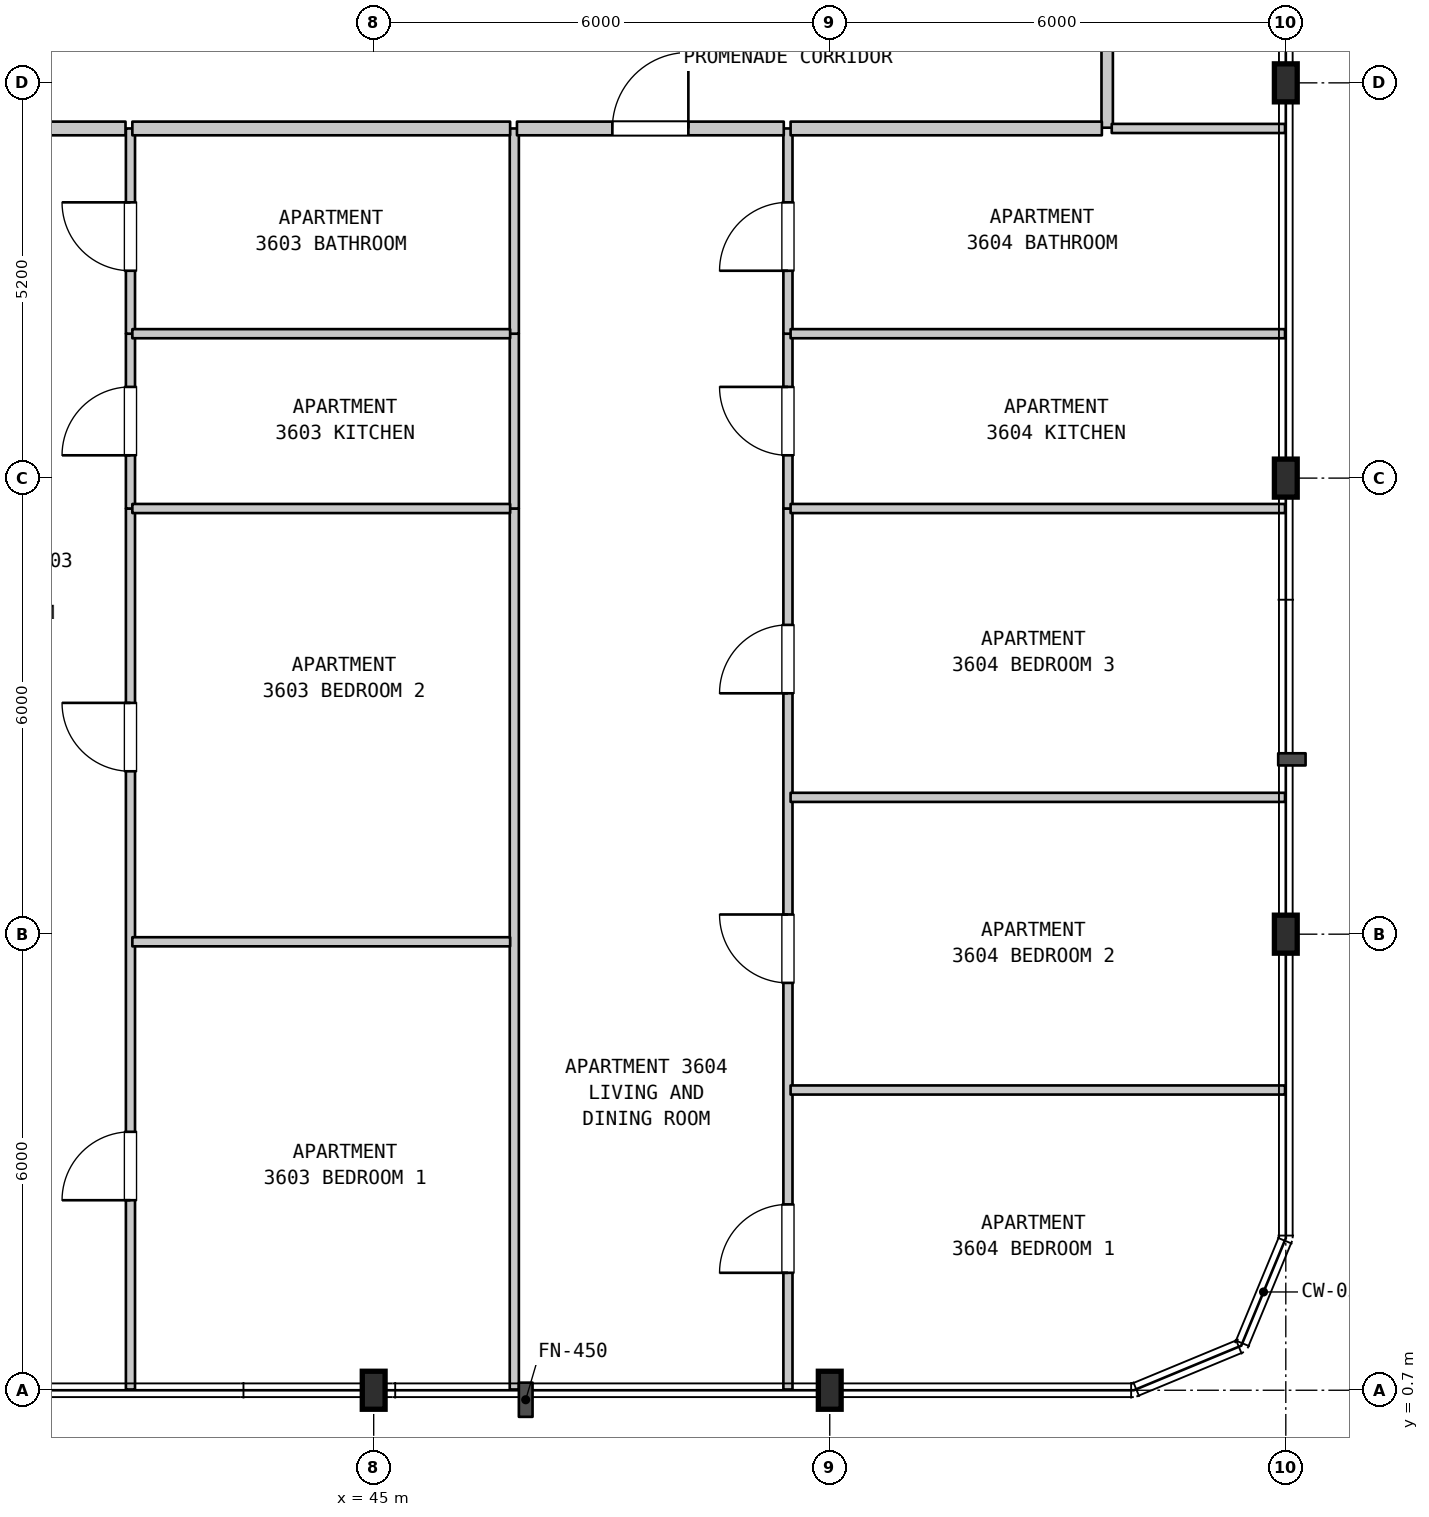
"""IFC4 building model, lengths in metres.
Left out: names, types, materials, properties, quantities, classifications, styles, units other than length and angle.
Written with IfcOpenShell. Run it as: python <this file> out.ifc"""

import sys

from ifc_helpers import new_model, si_unit, direction, frame, frame_2d, origin, origin_2d, place, context, subcontext, project, spatial, rectangle, i_section, extrude, element, fill, save


model = new_model("IFC4")
c1 = context("Model", 3, precision=1e-05, world=origin(), true_north=direction((0.0, 1.0)))
c2 = subcontext(c1, "Body", "Model", "MODEL_VIEW")
j1 = project(units=[si_unit("LENGTHUNIT", "METRE"), si_unit("PLANEANGLEUNIT", "RADIAN")], contexts=[c1])
p1 = place(None, origin())
s1 = spatial("IfcSite", under=j1, at=p1, CompositionType="ELEMENT")
p2 = place(p1, origin())
s2 = spatial("IfcBuilding", under=s1, at=p2, CompositionType="ELEMENT")
p3 = place(p2, frame((0.0, 0.0, 148.3)))
s3 = spatial("IfcBuildingStorey", under=s2, at=p3, CompositionType="ELEMENT", Elevation=148.3)
for number, where, z_axis, x_axis in (
    (1, (45.0, 0.7, 0.0), (0.0, 0.0, 1.0), (1.0, 0.0, 0.0)),
    (2, (51.0, 0.7, 0.0), (0.0, 0.0, 1.0), (1.0, 0.0, 0.0)),
    (3, (57.0, 6.7, 0.0), (0.0, 0.0, 1.0), (1.0, 0.0, 0.0)),
    (4, (57.0, 12.7, 0.0), (0.0, 0.0, 1.0), (1.0, 0.0, 0.0)),
    (5, (57.0, 17.9, 0.0), (0.0, 0.0, 1.0), (1.0, 0.0, 0.0)),
):
    element("IfcColumn", number, at=place(p3, frame(where, z_axis=z_axis, x_axis=x_axis)), inside=s3, PredefinedType="COLUMN", context=c2, shape_type="SweptSolid", body=[
        extrude(i_section(OverallWidth=0.3, OverallDepth=0.5, WebThickness=0.014, FlangeThickness=0.028, FilletRadius=0.027, at=origin_2d()), origin(), (0.0, 0.0, 1.0), 3.7),
    ])
p4 = place(p3, frame((41.8, 0.71, 0.0), z_axis=(0.0, 0.0, 1.0), x_axis=(0.0, 1.0, 0.0)))
e6 = element("IfcWall", 6, at=p4, inside=s3, PredefinedType="PARTITIONING", context=c2, shape_type="SweptSolid", body=[
    extrude(rectangle(XDim=11.59, YDim=0.12, at=frame_2d((5.795, 0.0))), origin(), (0.0, 0.0, 1.0), 3.385),
])
p5 = place(p4, frame((2.49, 0.0, 0.0)))
e7 = element("IfcOpeningElement", 7, at=p5, cuts=e6, PredefinedType="OPENING", context=c2, shape_type="SweptSolid", body=[
    extrude(rectangle(XDim=0.9, YDim=2.15, at=frame_2d((0.45, 1.075))), frame((0.0, 0.07, 0.0), z_axis=(0.0, -1.0, 0.0), x_axis=(1.0, 0.0, 0.0)), (0.0, 0.0, 1.0), 0.14),
])
p6 = place(p4, frame((8.133, 0.0, 0.0)))
e8 = element("IfcOpeningElement", 8, at=p6, cuts=e6, PredefinedType="OPENING", context=c2, shape_type="SweptSolid", body=[
    extrude(rectangle(XDim=0.9, YDim=2.15, at=frame_2d((0.45, 1.075))), frame((0.0, 0.07, 0.0), z_axis=(0.0, -1.0, 0.0), x_axis=(1.0, 0.0, 0.0)), (0.0, 0.0, 1.0), 0.14),
])
p7 = place(p3, frame((41.8, 12.3, 0.0), z_axis=(0.0, 0.0, 1.0), x_axis=(0.0, 1.0, 0.0)))
e9 = element("IfcWall", 9, at=p7, inside=s3, PredefinedType="PARTITIONING", context=c2, shape_type="SweptSolid", body=[
    extrude(rectangle(XDim=2.3, YDim=0.12, at=frame_2d((1.15, 0.0))), origin(), (0.0, 0.0, 1.0), 3.385),
])
p8 = place(p7, frame((0.7, 0.0, 0.0)))
e10 = element("IfcOpeningElement", 10, at=p8, cuts=e9, PredefinedType="OPENING", context=c2, shape_type="SweptSolid", body=[
    extrude(rectangle(XDim=0.9, YDim=2.15, at=frame_2d((0.45, 1.075))), frame((0.0, 0.07, 0.0), z_axis=(0.0, -1.0, 0.0), x_axis=(1.0, 0.0, 0.0)), (0.0, 0.0, 1.0), 0.14),
])
p9 = place(p3, frame((41.8, 14.6, 0.0), z_axis=(0.0, 0.0, 1.0), x_axis=(0.0, 1.0, 0.0)))
e11 = element("IfcWall", 11, at=p9, inside=s3, PredefinedType="PARTITIONING", context=c2, shape_type="SweptSolid", body=[
    extrude(rectangle(XDim=2.7, YDim=0.12, at=frame_2d((1.35, 0.0))), origin(), (0.0, 0.0, 1.0), 3.385),
])
p10 = place(p9, frame((0.828, 0.0, 0.0)))
e12 = element("IfcOpeningElement", 12, at=p10, cuts=e11, PredefinedType="OPENING", context=c2, shape_type="SweptSolid", body=[
    extrude(rectangle(XDim=0.9, YDim=2.1, at=frame_2d((0.45, 1.05))), frame((0.0, 0.07, 0.0), z_axis=(0.0, -1.0, 0.0), x_axis=(1.0, 0.0, 0.0)), (0.0, 0.0, 1.0), 0.14),
])
p11 = place(p3, frame((46.85, 0.71, 0.0), z_axis=(0.0, 0.0, 1.0), x_axis=(0.0, 1.0, 0.0)))
e13 = element("IfcWall", 13, at=p11, inside=s3, PredefinedType="PARTITIONING", context=c2, shape_type="SweptSolid", body=[
    extrude(rectangle(XDim=11.59, YDim=0.12, at=frame_2d((5.795, 0.0))), origin(), (0.0, 0.0, 1.0), 3.385),
])
p12 = place(p3, frame((46.85, 12.3, 0.0), z_axis=(0.0, 0.0, 1.0), x_axis=(0.0, 1.0, 0.0)))
e14 = element("IfcWall", 14, at=p12, inside=s3, PredefinedType="PARTITIONING", context=c2, shape_type="SweptSolid", body=[
    extrude(rectangle(XDim=2.3, YDim=0.12, at=frame_2d((1.15, 0.0))), origin(), (0.0, 0.0, 1.0), 3.385),
])
p13 = place(p3, frame((46.85, 14.6, 0.0), z_axis=(0.0, 0.0, 1.0), x_axis=(0.0, 1.0, 0.0)))
e15 = element("IfcWall", 15, at=p13, inside=s3, PredefinedType="PARTITIONING", context=c2, shape_type="SweptSolid", body=[
    extrude(rectangle(XDim=2.7, YDim=0.12, at=frame_2d((1.35, 0.0))), origin(), (0.0, 0.0, 1.0), 3.385),
])
p14 = place(p3, frame((50.45, 0.71, 0.0), z_axis=(0.0, 0.0, 1.0), x_axis=(0.0, 1.0, 0.0)))
e16 = element("IfcWall", 16, at=p14, inside=s3, PredefinedType="PARTITIONING", context=c2, shape_type="SweptSolid", body=[
    extrude(rectangle(XDim=11.59, YDim=0.12, at=frame_2d((5.795, 0.0))), origin(), (0.0, 0.0, 1.0), 3.385),
])
p15 = place(p14, frame((1.535, 0.0, 0.0)))
e17 = element("IfcOpeningElement", 17, at=p15, cuts=e16, PredefinedType="OPENING", context=c2, shape_type="SweptSolid", body=[
    extrude(rectangle(XDim=0.9, YDim=2.15, at=frame_2d((0.45, 1.075))), frame((0.0, 0.07, 0.0), z_axis=(0.0, -1.0, 0.0), x_axis=(1.0, 0.0, 0.0)), (0.0, 0.0, 1.0), 0.14),
])
p16 = place(p14, frame((5.349, 0.0, 0.0)))
e18 = element("IfcOpeningElement", 18, at=p16, cuts=e16, PredefinedType="OPENING", context=c2, shape_type="SweptSolid", body=[
    extrude(rectangle(XDim=0.9, YDim=2.15, at=frame_2d((0.45, 1.075))), frame((0.0, 0.07, 0.0), z_axis=(0.0, -1.0, 0.0), x_axis=(1.0, 0.0, 0.0)), (0.0, 0.0, 1.0), 0.14),
])
p17 = place(p14, frame((9.159, 0.0, 0.0)))
e19 = element("IfcOpeningElement", 19, at=p17, cuts=e16, PredefinedType="OPENING", context=c2, shape_type="SweptSolid", body=[
    extrude(rectangle(XDim=0.9, YDim=2.15, at=frame_2d((0.45, 1.075))), frame((0.0, 0.07, 0.0), z_axis=(0.0, -1.0, 0.0), x_axis=(1.0, 0.0, 0.0)), (0.0, 0.0, 1.0), 0.14),
])
p18 = place(p3, frame((50.45, 12.3, 0.0), z_axis=(0.0, 0.0, 1.0), x_axis=(0.0, 1.0, 0.0)))
e20 = element("IfcWall", 20, at=p18, inside=s3, PredefinedType="PARTITIONING", context=c2, shape_type="SweptSolid", body=[
    extrude(rectangle(XDim=2.3, YDim=0.12, at=frame_2d((1.15, 0.0))), origin(), (0.0, 0.0, 1.0), 3.385),
])
p19 = place(p18, frame((0.7, 0.0, 0.0)))
e21 = element("IfcOpeningElement", 21, at=p19, cuts=e20, PredefinedType="OPENING", context=c2, shape_type="SweptSolid", body=[
    extrude(rectangle(XDim=0.9, YDim=2.15, at=frame_2d((0.45, 1.075))), frame((0.0, 0.07, 0.0), z_axis=(0.0, -1.0, 0.0), x_axis=(1.0, 0.0, 0.0)), (0.0, 0.0, 1.0), 0.14),
])
p20 = place(p3, frame((50.45, 14.6, 0.0), z_axis=(0.0, 0.0, 1.0), x_axis=(0.0, 1.0, 0.0)))
e22 = element("IfcWall", 22, at=p20, inside=s3, PredefinedType="PARTITIONING", context=c2, shape_type="SweptSolid", body=[
    extrude(rectangle(XDim=2.7, YDim=0.12, at=frame_2d((1.35, 0.0))), origin(), (0.0, 0.0, 1.0), 3.385),
])
p21 = place(p20, frame((0.828, 0.0, 0.0)))
e23 = element("IfcOpeningElement", 23, at=p21, cuts=e22, PredefinedType="OPENING", context=c2, shape_type="SweptSolid", body=[
    extrude(rectangle(XDim=0.9, YDim=2.1, at=frame_2d((0.45, 1.05))), frame((0.0, 0.07, 0.0), z_axis=(0.0, -1.0, 0.0), x_axis=(1.0, 0.0, 0.0)), (0.0, 0.0, 1.0), 0.14),
])
p22 = place(p3, frame((54.65, 17.31, 0.0), z_axis=(0.0, 0.0, 1.0), x_axis=(0.0, 1.0, 0.0)))
e24 = element("IfcWall", 24, at=p22, inside=s3, PredefinedType="STANDARD", context=c2, shape_type="SweptSolid", body=[
    extrude(rectangle(XDim=2.19, YDim=0.15, at=frame_2d((1.095, 0.0))), origin(), (0.0, 0.0, 1.0), 3.385),
])
p23 = place(p3, frame((50.485, 4.65, 0.0), z_axis=(0.0, 0.0, 1.0), x_axis=(1.0, 0.0, 0.0)))
e25 = element("IfcWall", 25, at=p23, inside=s3, PredefinedType="PARTITIONING", context=c2, shape_type="SweptSolid", body=[
    extrude(rectangle(XDim=6.505, YDim=0.12, at=frame_2d((3.252, 0.0))), origin(), (0.0, 0.0, 1.0), 3.385),
])
p24 = place(p3, frame((41.825, 6.6, 0.0), z_axis=(0.0, 0.0, 1.0), x_axis=(1.0, 0.0, 0.0)))
e26 = element("IfcWall", 26, at=p24, inside=s3, PredefinedType="PARTITIONING", context=c2, shape_type="SweptSolid", body=[
    extrude(rectangle(XDim=4.97, YDim=0.12, at=frame_2d((2.485, 0.0))), origin(), (0.0, 0.0, 1.0), 2.785),
])
p25 = place(p3, frame((50.485, 8.5, 0.0), z_axis=(0.0, 0.0, 1.0), x_axis=(1.0, 0.0, 0.0)))
e27 = element("IfcWall", 27, at=p25, inside=s3, PredefinedType="PARTITIONING", context=c2, shape_type="SweptSolid", body=[
    extrude(rectangle(XDim=6.505, YDim=0.12, at=frame_2d((3.252, 0.0))), origin(), (0.0, 0.0, 1.0), 3.385),
])
p26 = place(p3, frame((41.825, 12.3, 0.0), z_axis=(0.0, 0.0, 1.0), x_axis=(1.0, 0.0, 0.0)))
e28 = element("IfcWall", 28, at=p26, inside=s3, PredefinedType="PARTITIONING", context=c2, shape_type="SweptSolid", body=[
    extrude(rectangle(XDim=4.97, YDim=0.12, at=frame_2d((2.485, 0.0))), origin(), (0.0, 0.0, 1.0), 3.385),
])
p27 = place(p3, frame((50.485, 12.3, 0.0), z_axis=(0.0, 0.0, 1.0), x_axis=(1.0, 0.0, 0.0)))
e29 = element("IfcWall", 29, at=p27, inside=s3, PredefinedType="PARTITIONING", context=c2, shape_type="SweptSolid", body=[
    extrude(rectangle(XDim=6.505, YDim=0.12, at=frame_2d((3.252, 0.0))), origin(), (0.0, 0.0, 1.0), 3.385),
])
p28 = place(p3, frame((41.825, 14.6, 0.0), z_axis=(0.0, 0.0, 1.0), x_axis=(1.0, 0.0, 0.0)))
e30 = element("IfcWall", 30, at=p28, inside=s3, PredefinedType="PARTITIONING", context=c2, shape_type="SweptSolid", body=[
    extrude(rectangle(XDim=4.97, YDim=0.12, at=frame_2d((2.485, 0.0))), origin(), (0.0, 0.0, 1.0), 3.385),
])
p29 = place(p3, frame((50.485, 14.6, 0.0), z_axis=(0.0, 0.0, 1.0), x_axis=(1.0, 0.0, 0.0)))
e31 = element("IfcWall", 31, at=p29, inside=s3, PredefinedType="PARTITIONING", context=c2, shape_type="SweptSolid", body=[
    extrude(rectangle(XDim=6.505, YDim=0.12, at=frame_2d((3.252, 0.0))), origin(), (0.0, 0.0, 1.0), 3.385),
])
p30 = place(p3, frame((38.225, 17.3, 0.0), z_axis=(0.0, 0.0, 1.0), x_axis=(1.0, 0.0, 0.0)))
e32 = element("IfcWall", 32, at=p30, inside=s3, PredefinedType="STANDARD", context=c2, shape_type="SweptSolid", body=[
    extrude(rectangle(XDim=3.51, YDim=0.18, at=frame_2d((1.755, 0.0))), origin(), (0.0, 0.0, 1.0), 3.385),
])
p31 = place(p30, frame((1.185, 0.0, 0.0)))
e33 = element("IfcOpeningElement", 33, at=p31, cuts=e32, PredefinedType="OPENING", context=c2, shape_type="SweptSolid", body=[
    extrude(rectangle(XDim=1.0, YDim=2.15, at=frame_2d((0.5, 1.075))), frame((0.0, 0.1, 0.0), z_axis=(0.0, -1.0, 0.0), x_axis=(1.0, 0.0, 0.0)), (0.0, 0.0, 1.0), 0.2),
])
p32 = place(p3, frame((41.825, 17.3, 0.0), z_axis=(0.0, 0.0, 1.0), x_axis=(1.0, 0.0, 0.0)))
e34 = element("IfcWall", 34, at=p32, inside=s3, PredefinedType="STANDARD", context=c2, shape_type="SweptSolid", body=[
    extrude(rectangle(XDim=4.97, YDim=0.18, at=frame_2d((2.485, 0.0))), origin(), (0.0, 0.0, 1.0), 3.385),
])
p33 = place(p3, frame((46.885, 17.3, 0.0), z_axis=(0.0, 0.0, 1.0), x_axis=(1.0, 0.0, 0.0)))
e35 = element("IfcWall", 35, at=p33, inside=s3, PredefinedType="STANDARD", context=c2, shape_type="SweptSolid", body=[
    extrude(rectangle(XDim=3.51, YDim=0.18, at=frame_2d((1.755, 0.0))), origin(), (0.0, 0.0, 1.0), 3.385),
])
p34 = place(p33, frame((1.255, 0.0, 0.0)))
e36 = element("IfcOpeningElement", 36, at=p34, cuts=e35, PredefinedType="OPENING", context=c2, shape_type="SweptSolid", body=[
    extrude(rectangle(XDim=1.0, YDim=2.15, at=frame_2d((0.5, 1.075))), frame((0.0, 0.1, 0.0), z_axis=(0.0, -1.0, 0.0), x_axis=(1.0, 0.0, 0.0)), (0.0, 0.0, 1.0), 0.2),
])
p35 = place(p3, frame((50.485, 17.3, 0.0), z_axis=(0.0, 0.0, 1.0), x_axis=(1.0, 0.0, 0.0)))
e37 = element("IfcWall", 37, at=p35, inside=s3, PredefinedType="STANDARD", context=c2, shape_type="SweptSolid", body=[
    extrude(rectangle(XDim=4.095, YDim=0.18, at=frame_2d((2.047, 0.0))), origin(), (0.0, 0.0, 1.0), 3.385),
])
p36 = place(p3, frame((54.71, 17.3, 0.0), z_axis=(0.0, 0.0, 1.0), x_axis=(1.0, 0.0, 0.0)))
e38 = element("IfcWall", 38, at=p36, inside=s3, PredefinedType="PARTITIONING", context=c2, shape_type="SweptSolid", body=[
    extrude(rectangle(XDim=2.28, YDim=0.12, at=frame_2d((1.14, 0.0))), origin(), (0.0, 0.0, 1.0), 3.385),
])
p37 = place(p5, origin())
e39 = element("IfcDoor", 39, at=p37, inside=s3, OperationType="SINGLE_SWING_LEFT", PredefinedType="DOOR", context=c2, shape_type="SweptSolid", body=[
    extrude(rectangle(XDim=0.9, YDim=2.15, at=frame_2d((0.45, 1.075))), frame((0.0, 0.025, 0.0), z_axis=(0.0, -1.0, 0.0), x_axis=(1.0, 0.0, 0.0)), (0.0, 0.0, 1.0), 0.05),
])
fill(e7, e39)
p38 = place(p6, origin())
e40 = element("IfcDoor", 40, at=p38, inside=s3, OperationType="SINGLE_SWING_RIGHT", PredefinedType="DOOR", context=c2, shape_type="SweptSolid", body=[
    extrude(rectangle(XDim=0.9, YDim=2.15, at=frame_2d((0.45, 1.075))), frame((0.0, 0.025, 0.0), z_axis=(0.0, -1.0, 0.0), x_axis=(1.0, 0.0, 0.0)), (0.0, 0.0, 1.0), 0.05),
])
fill(e8, e40)
p39 = place(p8, origin())
e41 = element("IfcDoor", 41, at=p39, inside=s3, OperationType="SINGLE_SWING_LEFT", PredefinedType="DOOR", context=c2, shape_type="SweptSolid", body=[
    extrude(rectangle(XDim=0.9, YDim=2.15, at=frame_2d((0.45, 1.075))), frame((0.0, 0.025, 0.0), z_axis=(0.0, -1.0, 0.0), x_axis=(1.0, 0.0, 0.0)), (0.0, 0.0, 1.0), 0.05),
])
fill(e10, e41)
p40 = place(p10, origin())
e42 = element("IfcDoor", 42, at=p40, inside=s3, OperationType="SINGLE_SWING_RIGHT", PredefinedType="DOOR", context=c2, shape_type="SweptSolid", body=[
    extrude(rectangle(XDim=0.9, YDim=2.1, at=frame_2d((0.45, 1.05))), frame((0.0, 0.025, 0.0), z_axis=(0.0, -1.0, 0.0), x_axis=(1.0, 0.0, 0.0)), (0.0, 0.0, 1.0), 0.05),
])
fill(e12, e42)
p41 = place(p15, origin())
e43 = element("IfcDoor", 43, at=p41, inside=s3, OperationType="SINGLE_SWING_LEFT", PredefinedType="DOOR", context=c2, shape_type="SweptSolid", body=[
    extrude(rectangle(XDim=0.9, YDim=2.15, at=frame_2d((0.45, 1.075))), frame((0.0, 0.025, 0.0), z_axis=(0.0, -1.0, 0.0), x_axis=(1.0, 0.0, 0.0)), (0.0, 0.0, 1.0), 0.05),
])
fill(e17, e43)
p42 = place(p16, origin())
e44 = element("IfcDoor", 44, at=p42, inside=s3, OperationType="SINGLE_SWING_RIGHT", PredefinedType="DOOR", context=c2, shape_type="SweptSolid", body=[
    extrude(rectangle(XDim=0.9, YDim=2.15, at=frame_2d((0.45, 1.075))), frame((0.0, 0.025, 0.0), z_axis=(0.0, -1.0, 0.0), x_axis=(1.0, 0.0, 0.0)), (0.0, 0.0, 1.0), 0.05),
])
fill(e18, e44)
p43 = place(p17, origin())
e45 = element("IfcDoor", 45, at=p43, inside=s3, OperationType="SINGLE_SWING_LEFT", PredefinedType="DOOR", context=c2, shape_type="SweptSolid", body=[
    extrude(rectangle(XDim=0.9, YDim=2.15, at=frame_2d((0.45, 1.075))), frame((0.0, 0.025, 0.0), z_axis=(0.0, -1.0, 0.0), x_axis=(1.0, 0.0, 0.0)), (0.0, 0.0, 1.0), 0.05),
])
fill(e19, e45)
p44 = place(p19, origin())
e46 = element("IfcDoor", 46, at=p44, inside=s3, OperationType="SINGLE_SWING_RIGHT", PredefinedType="DOOR", context=c2, shape_type="SweptSolid", body=[
    extrude(rectangle(XDim=0.9, YDim=2.15, at=frame_2d((0.45, 1.075))), frame((0.0, 0.025, 0.0), z_axis=(0.0, -1.0, 0.0), x_axis=(1.0, 0.0, 0.0)), (0.0, 0.0, 1.0), 0.05),
])
fill(e21, e46)
p45 = place(p21, origin())
e47 = element("IfcDoor", 47, at=p45, inside=s3, OperationType="SINGLE_SWING_LEFT", PredefinedType="DOOR", context=c2, shape_type="SweptSolid", body=[
    extrude(rectangle(XDim=0.9, YDim=2.1, at=frame_2d((0.45, 1.05))), frame((0.0, 0.025, 0.0), z_axis=(0.0, -1.0, 0.0), x_axis=(1.0, 0.0, 0.0)), (0.0, 0.0, 1.0), 0.05),
])
fill(e23, e47)
p46 = place(p34, origin())
e48 = element("IfcDoor", 48, at=p46, inside=s3, OperationType="SINGLE_SWING_RIGHT", PredefinedType="DOOR", context=c2, shape_type="SweptSolid", body=[
    extrude(rectangle(XDim=1.0, YDim=2.15, at=frame_2d((0.5, 1.075))), frame((0.0, 0.025, 0.0), z_axis=(0.0, -1.0, 0.0), x_axis=(1.0, 0.0, 0.0)), (0.0, 0.0, 1.0), 0.05),
])
fill(e36, e48)
save(model, sys.argv[1])
